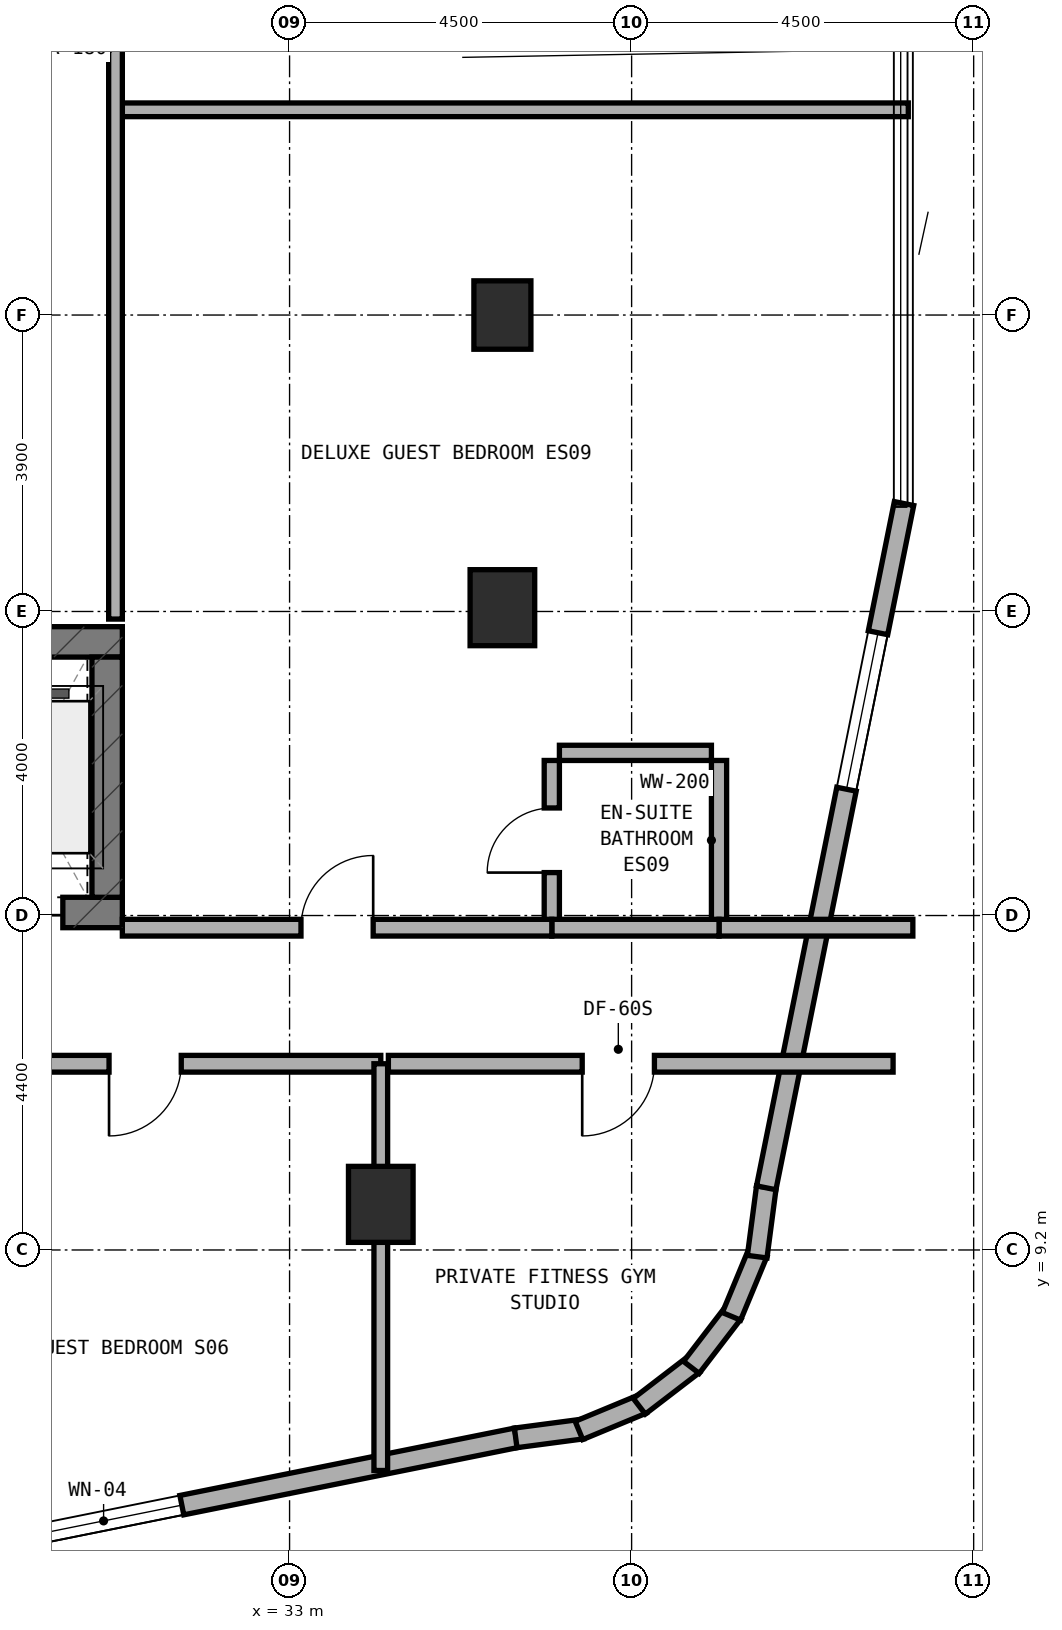
"""IFC4 building model, lengths in metres.
Left out: names, types, materials, properties, quantities, classifications, styles, units other than length and angle.
Written with IfcOpenShell. Run it as: python <this file> out.ifc"""

import sys

from ifc_helpers import new_model, si_unit, direction, frame, frame_2d, origin, origin_2d, place, context, subcontext, project, spatial, rectangle, extrude, element, fill, save


model = new_model("IFC4")
c1 = context("Model", 3, precision=1e-05, world=origin(), true_north=direction((0.0, 1.0)))
c2 = subcontext(c1, "Body", "Model", "MODEL_VIEW")
j1 = project(units=[si_unit("LENGTHUNIT", "METRE"), si_unit("PLANEANGLEUNIT", "RADIAN")], contexts=[c1])
p1 = place(None, origin())
s1 = spatial("IfcSite", under=j1, at=p1, CompositionType="ELEMENT")
p2 = place(p1, origin())
s2 = spatial("IfcBuilding", under=s1, at=p2, CompositionType="ELEMENT")
p3 = place(p2, frame((0.0, 0.0, 159.0)))
s3 = spatial("IfcBuildingStorey", under=s2, at=p3, CompositionType="ELEMENT", Elevation=159.0)
p4 = place(p3, frame((6.4, 13.64, 0.0), z_axis=(0.0, 0.0, 1.0), x_axis=(1.0, 0.0, 0.0)))
e1 = element("IfcWall", 1, at=p4, inside=s3, PredefinedType="SHEAR", context=c2, shape_type="SweptSolid", body=[
    extrude(rectangle(XDim=24.4, YDim=0.4, at=frame_2d((12.2, 0.0))), origin(), (0.0, 0.0, 1.0), 3.5),
])
p5 = place(p4, frame((9.15, 0.0, 0.0)))
e2 = element("IfcOpeningElement", 2, at=p5, cuts=e1, PredefinedType="OPENING", context=c2, shape_type="SweptSolid", body=[
    extrude(rectangle(XDim=1.2, YDim=2.15, at=frame_2d((0.6, 1.075))), frame((0.0, 0.21, 0.0), z_axis=(0.0, -1.0, 0.0), x_axis=(1.0, 0.0, 0.0)), (0.0, 0.0, 1.0), 0.42),
])
p6 = place(p4, frame((16.94, 0.0, 0.0)))
e3 = element("IfcOpeningElement", 3, at=p6, cuts=e1, PredefinedType="OPENING", context=c2, shape_type="SweptSolid", body=[
    extrude(rectangle(XDim=0.85, YDim=2.1, at=frame_2d((0.425, 1.05))), frame((0.0, 0.21, 0.0), z_axis=(0.0, -1.0, 0.0), x_axis=(1.0, 0.0, 0.0)), (0.0, 0.0, 1.0), 0.42),
])
p7 = place(p4, frame((18.783, 0.0, 0.0)))
e4 = element("IfcOpeningElement", 4, at=p7, cuts=e1, PredefinedType="OPENING", context=c2, shape_type="SweptSolid", body=[
    extrude(rectangle(XDim=1.1, YDim=2.15, at=frame_2d((0.55, 1.075))), frame((0.0, 0.21, 0.0), z_axis=(0.0, -1.0, 0.0), x_axis=(1.0, 0.0, 0.0)), (0.0, 0.0, 1.0), 0.42),
])
p8 = place(p4, frame((20.65, 0.0, 0.0)))
e5 = element("IfcOpeningElement", 5, at=p8, cuts=e1, PredefinedType="OPENING", context=c2, shape_type="SweptSolid", body=[
    extrude(rectangle(XDim=1.1, YDim=2.15, at=frame_2d((0.55, 1.075))), frame((0.0, 0.21, 0.0), z_axis=(0.0, -1.0, 0.0), x_axis=(1.0, 0.0, 0.0)), (0.0, 0.0, 1.0), 0.42),
])
p9 = place(p4, frame((22.517, 0.0, 0.0)))
e6 = element("IfcOpeningElement", 6, at=p9, cuts=e1, PredefinedType="OPENING", context=c2, shape_type="SweptSolid", body=[
    extrude(rectangle(XDim=1.1, YDim=2.15, at=frame_2d((0.55, 1.075))), frame((0.0, 0.21, 0.0), z_axis=(0.0, -1.0, 0.0), x_axis=(1.0, 0.0, 0.0)), (0.0, 0.0, 1.0), 0.42),
])
p10 = place(p3, frame((6.4, 17.2, 0.0), z_axis=(0.0, 0.0, 1.0), x_axis=(1.0, 0.0, 0.0)))
e7 = element("IfcWall", 7, at=p10, inside=s3, PredefinedType="SHEAR", context=c2, shape_type="SweptSolid", body=[
    extrude(rectangle(XDim=24.4, YDim=0.4, at=frame_2d((12.2, 0.0))), origin(), (0.0, 0.0, 1.0), 3.5),
])
p11 = place(p3, frame((30.6, 13.84, 0.0), z_axis=(0.0, 0.0, 1.0), x_axis=(0.0, 1.0, 0.0)))
e8 = element("IfcWall", 8, at=p11, inside=s3, PredefinedType="SHEAR", context=c2, shape_type="SweptSolid", body=[
    extrude(rectangle(XDim=3.16, YDim=0.4, at=frame_2d((1.58, 0.0))), origin(), (0.0, 0.0, 1.0), 3.5),
])
p12 = place(p3, frame((34.2, 9.8, 0.0), z_axis=(0.0, 0.0, 1.0), x_axis=(1.0, 0.0, 0.0)))
e9 = element("IfcColumn", 9, at=p12, inside=s3, PredefinedType="COLUMN", context=c2, shape_type="SweptSolid", body=[
    extrude(rectangle(XDim=0.85, YDim=1.0, at=origin_2d()), origin(), (0.0, 0.0, 1.0), 3.5),
])
p13 = place(p3, frame((35.8, 21.5, 0.0), z_axis=(0.0, 0.0, 1.0), x_axis=(1.0, 0.0, 0.0)))
e10 = element("IfcColumn", 10, at=p13, inside=s3, PredefinedType="COLUMN", context=c2, shape_type="SweptSolid", body=[
    extrude(rectangle(XDim=0.75, YDim=0.9, at=origin_2d()), origin(), (0.0, 0.0, 1.0), 3.5),
])
p14 = place(p3, frame((35.8, 17.65, 0.0), z_axis=(0.0, 0.0, 1.0), x_axis=(1.0, 0.0, 0.0)))
e11 = element("IfcColumn", 11, at=p14, inside=s3, PredefinedType="COLUMN", context=c2, shape_type="SweptSolid", body=[
    extrude(rectangle(XDim=0.85, YDim=1.0, at=origin_2d()), origin(), (0.0, 0.0, 1.0), 3.5),
])
p15 = place(p3, frame((26.98, 4.916, 0.0), z_axis=(0.0, 0.0, 1.0), x_axis=(0.980315963543, 0.197435082048, 0.0)))
e12 = element("IfcWall", 12, at=p15, inside=s3, PredefinedType="STANDARD", context=c2, shape_type="SweptSolid", body=[
    extrude(rectangle(XDim=9.183, YDim=0.26, at=frame_2d((4.591, 0.0))), origin(), (0.0, 0.0, 1.0), 3.22),
])
p16 = place(p15, frame((2.595, 0.0, 0.85)))
e13 = element("IfcOpeningElement", 13, at=p16, cuts=e12, PredefinedType="OPENING", context=c2, shape_type="SweptSolid", body=[
    extrude(rectangle(XDim=2.1, YDim=1.5, at=frame_2d((1.05, 0.75))), frame((0.0, 0.14, 0.0), z_axis=(0.0, -1.0, 0.0), x_axis=(1.0, 0.0, 0.0)), (0.0, 0.0, 1.0), 0.28),
])
p17 = place(p3, frame((35.975, 6.728, 0.0), z_axis=(0.0, 0.0, 1.0), x_axis=(0.991388484223, 0.130953706898, 0.0)))
e14 = element("IfcWall", 14, at=p17, inside=s3, PredefinedType="STANDARD", context=c2, shape_type="SweptSolid", body=[
    extrude(rectangle(XDim=0.885, YDim=0.26, at=frame_2d((0.443, 0.0))), origin(), (0.0, 0.0, 1.0), 3.22),
])
p18 = place(p3, frame((36.807, 6.826, 0.0), z_axis=(0.0, 0.0, 1.0), x_axis=(0.923627776508, 0.383290660547, 0.0)))
e15 = element("IfcWall", 15, at=p18, inside=s3, PredefinedType="STANDARD", context=c2, shape_type="SweptSolid", body=[
    extrude(rectangle(XDim=0.903, YDim=0.26, at=frame_2d((0.452, 0.0))), origin(), (0.0, 0.0, 1.0), 3.22),
])
p19 = place(p3, frame((37.601, 7.144, 0.0), z_axis=(0.0, 0.0, 1.0), x_axis=(0.793458244748, 0.608624690463, 0.0)))
e16 = element("IfcWall", 16, at=p19, inside=s3, PredefinedType="STANDARD", context=c2, shape_type="SweptSolid", body=[
    extrude(rectangle(XDim=0.902, YDim=0.26, at=frame_2d((0.451, 0.0))), origin(), (0.0, 0.0, 1.0), 3.22),
])
p20 = place(p3, frame((38.286, 7.655, 0.0), z_axis=(0.0, 0.0, 1.0), x_axis=(0.608494022858, 0.793558456666, 0.0)))
e17 = element("IfcWall", 17, at=p20, inside=s3, PredefinedType="STANDARD", context=c2, shape_type="SweptSolid", body=[
    extrude(rectangle(XDim=0.902, YDim=0.26, at=frame_2d((0.451, 0.0))), origin(), (0.0, 0.0, 1.0), 3.22),
])
p21 = place(p3, frame((38.814, 8.327, 0.0), z_axis=(0.0, 0.0, 1.0), x_axis=(0.383155708213, 0.923683767999, 0.0)))
e18 = element("IfcWall", 18, at=p21, inside=s3, PredefinedType="STANDARD", context=c2, shape_type="SweptSolid", body=[
    extrude(rectangle(XDim=0.903, YDim=0.26, at=frame_2d((0.451, 0.0))), origin(), (0.0, 0.0, 1.0), 3.22),
])
p22 = place(p3, frame((39.152, 9.112, 0.0), z_axis=(0.0, 0.0, 1.0), x_axis=(0.130200706103, 0.991487658083, 0.0)))
e19 = element("IfcWall", 19, at=p22, inside=s3, PredefinedType="STANDARD", context=c2, shape_type="SweptSolid", body=[
    extrude(rectangle(XDim=0.921, YDim=0.26, at=frame_2d((0.46, 0.0))), origin(), (0.0, 0.0, 1.0), 3.22),
])
p23 = place(p3, frame((39.271, 10.018, 0.0), z_axis=(0.0, 0.0, 1.0), x_axis=(0.197435082048, 0.980315963543, 0.0)))
e20 = element("IfcWall", 20, at=p23, inside=s3, PredefinedType="STANDARD", context=c2, shape_type="SweptSolid", body=[
    extrude(rectangle(XDim=9.183, YDim=0.26, at=frame_2d((4.591, 0.0))), origin(), (0.0, 0.0, 1.0), 3.22),
])
p24 = place(p23, frame((5.349, 0.0, 0.85)))
e21 = element("IfcOpeningElement", 21, at=p24, cuts=e20, PredefinedType="OPENING", context=c2, shape_type="SweptSolid", body=[
    extrude(rectangle(XDim=2.1, YDim=1.5, at=frame_2d((1.05, 0.75))), frame((0.0, 0.14, 0.0), z_axis=(0.0, -1.0, 0.0), x_axis=(1.0, 0.0, 0.0)), (0.0, 0.0, 1.0), 0.28),
])
p25 = place(p3, frame((28.0, 11.65, 0.0), z_axis=(0.0, 0.0, 1.0), x_axis=(1.0, 0.0, 0.0)))
e22 = element("IfcWall", 22, at=p25, inside=s3, PredefinedType="SOLIDWALL", context=c2, shape_type="SweptSolid", body=[
    extrude(rectangle(XDim=6.2, YDim=0.22, at=frame_2d((3.1, 0.0))), origin(), (0.0, 0.0, 1.0), 2.795),
])
p26 = place(p25, frame((2.625, 0.0, 0.0)))
e23 = element("IfcOpeningElement", 23, at=p26, cuts=e22, PredefinedType="OPENING", context=c2, shape_type="SweptSolid", body=[
    extrude(rectangle(XDim=0.95, YDim=2.1, at=frame_2d((0.475, 1.05))), frame((0.0, 0.12, 0.0), z_axis=(0.0, -1.0, 0.0), x_axis=(1.0, 0.0, 0.0)), (0.0, 0.0, 1.0), 0.24),
])
p27 = place(p3, frame((34.2, 6.299, 0.0), z_axis=(0.0, 0.0, 1.0), x_axis=(0.0, 1.0, 0.0)))
e24 = element("IfcWall", 24, at=p27, inside=s3, PredefinedType="SOLIDWALL", context=c2, shape_type="SweptSolid", body=[
    extrude(rectangle(XDim=5.351, YDim=0.18, at=frame_2d((2.675, 0.0))), origin(), (0.0, 0.0, 1.0), 2.795),
])
p28 = place(p3, frame((34.3, 11.65, 0.0), z_axis=(0.0, 0.0, 1.0), x_axis=(1.0, 0.0, 0.0)))
e25 = element("IfcWall", 25, at=p28, inside=s3, PredefinedType="SOLIDWALL", context=c2, shape_type="SweptSolid", body=[
    extrude(rectangle(XDim=6.64, YDim=0.22, at=frame_2d((3.32, 0.0))), origin(), (0.0, 0.0, 1.0), 2.835),
])
p29 = place(p28, frame((2.55, 0.0, 0.0)))
e26 = element("IfcOpeningElement", 26, at=p29, cuts=e25, PredefinedType="OPENING", context=c2, shape_type="SweptSolid", body=[
    extrude(rectangle(XDim=0.95, YDim=2.1, at=frame_2d((0.475, 1.05))), frame((0.0, 0.12, 0.0), z_axis=(0.0, -1.0, 0.0), x_axis=(1.0, 0.0, 0.0)), (0.0, 0.0, 1.0), 0.24),
])
p30 = place(p3, frame((30.8, 24.2, 0.0), z_axis=(0.0, 0.0, 1.0), x_axis=(1.0, 0.0, 0.0)))
e27 = element("IfcWall", 27, at=p30, inside=s3, PredefinedType="SOLIDWALL", context=c2, shape_type="SweptSolid", body=[
    extrude(rectangle(XDim=10.34, YDim=0.18, at=frame_2d((5.17, 0.0))), origin(), (0.0, 0.0, 1.0), 2.835),
])
p31 = place(p3, frame((30.71, 17.5, 0.0), z_axis=(0.0, 0.0, 1.0), x_axis=(0.0, 1.0, 0.0)))
e28 = element("IfcWall", 28, at=p31, inside=s3, PredefinedType="SOLIDWALL", context=c2, shape_type="SweptSolid", body=[
    extrude(rectangle(XDim=15.0, YDim=0.18, at=frame_2d((7.5, 0.0))), origin(), (0.0, 0.0, 1.0), 2.795),
])
p32 = place(p3, frame((36.45, 13.54, 0.0), z_axis=(0.0, 0.0, 1.0), x_axis=(0.0, 1.0, 0.0)))
e29 = element("IfcWall", 29, at=p32, inside=s3, PredefinedType="PLUMBINGWALL", context=c2, shape_type="SweptSolid", body=[
    extrude(rectangle(XDim=2.1, YDim=0.2, at=frame_2d((1.05, 0.0))), origin(), (0.0, 0.0, 1.0), 3.22),
])
p33 = place(p32, frame((0.625, 0.0, 0.0)))
e30 = element("IfcOpeningElement", 30, at=p33, cuts=e29, PredefinedType="OPENING", context=c2, shape_type="SweptSolid", body=[
    extrude(rectangle(XDim=0.85, YDim=2.1, at=frame_2d((0.425, 1.05))), frame((0.0, 0.11, 0.0), z_axis=(0.0, -1.0, 0.0), x_axis=(1.0, 0.0, 0.0)), (0.0, 0.0, 1.0), 0.22),
])
p34 = place(p3, frame((36.55, 15.74, 0.0), z_axis=(0.0, 0.0, 1.0), x_axis=(1.0, 0.0, 0.0)))
e31 = element("IfcWall", 31, at=p34, inside=s3, PredefinedType="PLUMBINGWALL", context=c2, shape_type="SweptSolid", body=[
    extrude(rectangle(XDim=2.0, YDim=0.2, at=frame_2d((1.0, 0.0))), origin(), (0.0, 0.0, 1.0), 3.22),
])
p35 = place(p3, frame((38.65, 13.54, 0.0), z_axis=(0.0, 0.0, 1.0), x_axis=(0.0, 1.0, 0.0)))
e32 = element("IfcWall", 32, at=p35, inside=s3, PredefinedType="PLUMBINGWALL", context=c2, shape_type="SweptSolid", body=[
    extrude(rectangle(XDim=2.1, YDim=0.2, at=frame_2d((1.05, 0.0))), origin(), (0.0, 0.0, 1.0), 3.22),
])
p36 = place(p3, frame((38.65, 13.44, 0.0), z_axis=(0.0, 0.0, 1.0), x_axis=(1.0, 0.0, 0.0)))
e33 = element("IfcWall", 33, at=p36, inside=s3, PredefinedType="SOLIDWALL", context=c2, shape_type="SweptSolid", body=[
    extrude(rectangle(XDim=2.55, YDim=0.22, at=frame_2d((1.275, 0.0))), origin(), (0.0, 0.0, 1.0), 3.22),
])
p37 = place(p3, frame((36.45, 13.44, 0.0), z_axis=(0.0, 0.0, 1.0), x_axis=(1.0, 0.0, 0.0)))
e34 = element("IfcWall", 34, at=p37, inside=s3, PredefinedType="SOLIDWALL", context=c2, shape_type="SweptSolid", body=[
    extrude(rectangle(XDim=2.2, YDim=0.22, at=frame_2d((1.1, 0.0))), origin(), (0.0, 0.0, 1.0), 3.22),
])
p38 = place(p3, frame((30.8, 13.44, 0.0), z_axis=(0.0, 0.0, 1.0), x_axis=(1.0, 0.0, 0.0)))
e35 = element("IfcWall", 35, at=p38, inside=s3, PredefinedType="SOLIDWALL", context=c2, shape_type="SweptSolid", body=[
    extrude(rectangle(XDim=5.65, YDim=0.22, at=frame_2d((2.825, 0.0))), origin(), (0.0, 0.0, 1.0), 2.795),
])
p39 = place(p38, frame((2.35, 0.0, 0.0)))
e36 = element("IfcOpeningElement", 36, at=p39, cuts=e35, PredefinedType="OPENING", context=c2, shape_type="SweptSolid", body=[
    extrude(rectangle(XDim=0.95, YDim=2.1, at=frame_2d((0.475, 1.05))), frame((0.0, 0.12, 0.0), z_axis=(0.0, -1.0, 0.0), x_axis=(1.0, 0.0, 0.0)), (0.0, 0.0, 1.0), 0.24),
])
p40 = place(p16, origin())
e37 = element("IfcWindow", 37, at=p40, inside=s3, PartitioningType="SINGLE_PANEL", PredefinedType="WINDOW", context=c2, shape_type="SweptSolid", body=[
    extrude(rectangle(XDim=2.1, YDim=1.5, at=frame_2d((1.05, 0.75))), frame((0.0, 0.03, 0.0), z_axis=(0.0, -1.0, 0.0), x_axis=(1.0, 0.0, 0.0)), (0.0, 0.0, 1.0), 0.06),
])
fill(e13, e37)
p41 = place(p24, origin())
e38 = element("IfcWindow", 38, at=p41, inside=s3, PartitioningType="SINGLE_PANEL", PredefinedType="WINDOW", context=c2, shape_type="SweptSolid", body=[
    extrude(rectangle(XDim=2.1, YDim=1.5, at=frame_2d((1.05, 0.75))), frame((0.0, 0.03, 0.0), z_axis=(0.0, -1.0, 0.0), x_axis=(1.0, 0.0, 0.0)), (0.0, 0.0, 1.0), 0.06),
])
fill(e21, e38)
p42 = place(p9, frame((1.1, 0.0, 0.0), z_axis=(0.0, 0.0, 1.0), x_axis=(-1.0, 0.0, 0.0)))
e39 = element("IfcDoor", 39, at=p42, inside=s3, OperationType="DOUBLE_DOOR_SLIDING", PredefinedType="DOOR", context=c2, shape_type="SweptSolid", body=[
    extrude(rectangle(XDim=1.1, YDim=2.15, at=frame_2d((0.55, 1.075))), frame((0.0, 0.025, 0.0), z_axis=(0.0, -1.0, 0.0), x_axis=(1.0, 0.0, 0.0)), (0.0, 0.0, 1.0), 0.05),
])
fill(e6, e39)
p43 = place(p26, frame((0.95, 0.0, 0.0), z_axis=(0.0, 0.0, 1.0), x_axis=(-1.0, 0.0, 0.0)))
e40 = element("IfcDoor", 40, at=p43, inside=s3, OperationType="SINGLE_SWING_RIGHT", PredefinedType="DOOR", context=c2, shape_type="SweptSolid", body=[
    extrude(rectangle(XDim=0.95, YDim=2.1, at=frame_2d((0.475, 1.05))), frame((0.0, 0.025, 0.0), z_axis=(0.0, -1.0, 0.0), x_axis=(1.0, 0.0, 0.0)), (0.0, 0.0, 1.0), 0.05),
])
fill(e23, e40)
p44 = place(p29, frame((0.95, 0.0, 0.0), z_axis=(0.0, 0.0, 1.0), x_axis=(-1.0, 0.0, 0.0)))
e41 = element("IfcDoor", 41, at=p44, inside=s3, OperationType="SINGLE_SWING_RIGHT", PredefinedType="DOOR", context=c2, shape_type="SweptSolid", body=[
    extrude(rectangle(XDim=0.95, YDim=2.1, at=frame_2d((0.475, 1.05))), frame((0.0, 0.025, 0.0), z_axis=(0.0, -1.0, 0.0), x_axis=(1.0, 0.0, 0.0)), (0.0, 0.0, 1.0), 0.05),
])
fill(e26, e41)
p45 = place(p33, origin())
e42 = element("IfcDoor", 42, at=p45, inside=s3, OperationType="SINGLE_SWING_LEFT", PredefinedType="DOOR", context=c2, shape_type="SweptSolid", body=[
    extrude(rectangle(XDim=0.85, YDim=2.1, at=frame_2d((0.425, 1.05))), frame((0.0, 0.025, 0.0), z_axis=(0.0, -1.0, 0.0), x_axis=(1.0, 0.0, 0.0)), (0.0, 0.0, 1.0), 0.05),
])
fill(e30, e42)
p46 = place(p39, origin())
e43 = element("IfcDoor", 43, at=p46, inside=s3, OperationType="SINGLE_SWING_RIGHT", PredefinedType="DOOR", context=c2, shape_type="SweptSolid", body=[
    extrude(rectangle(XDim=0.95, YDim=2.1, at=frame_2d((0.475, 1.05))), frame((0.0, 0.025, 0.0), z_axis=(0.0, -1.0, 0.0), x_axis=(1.0, 0.0, 0.0)), (0.0, 0.0, 1.0), 0.05),
])
fill(e36, e43)
save(model, sys.argv[1])
